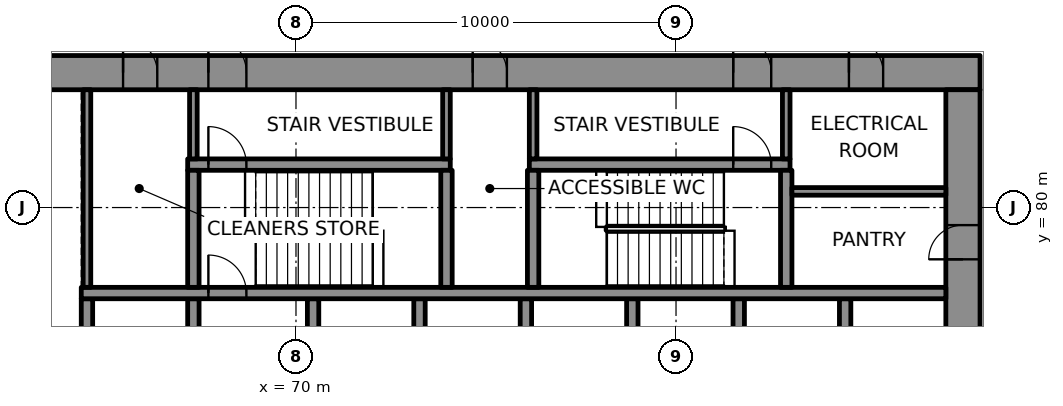
"""IFC4 building model, lengths in metres.
Left out: names, types, materials, properties, quantities, classifications, styles, units other than length and angle.
Written with IfcOpenShell. Run it as: python <this file> out.ifc"""

import sys

from ifc_helpers import new_model, si_unit, direction, frame, frame_2d, origin, place, context, subcontext, project, spatial, rectangle, extrude, element, fill, save


model = new_model("IFC4")
c1 = context("Model", 3, precision=1e-05, world=origin(), true_north=direction((0.0, 1.0)))
c2 = subcontext(c1, "Body", "Model", "MODEL_VIEW")
j1 = project(units=[si_unit("LENGTHUNIT", "METRE"), si_unit("PLANEANGLEUNIT", "RADIAN")], contexts=[c1])
p1 = place(None, origin())
s1 = spatial("IfcSite", under=j1, at=p1, CompositionType="ELEMENT")
p2 = place(p1, origin())
s2 = spatial("IfcBuilding", under=s1, at=p2, CompositionType="ELEMENT")
p3 = place(p2, frame((0.0, 0.0, 128.2)))
s3 = spatial("IfcBuildingStorey", under=s2, at=p3, CompositionType="ELEMENT", Elevation=128.2)
p4 = place(p3, frame((62.0, 83.55, 0.0), z_axis=(0.0, 0.0, 1.0), x_axis=(1.0, 0.0, 0.0)))
e1 = element("IfcWall", 1, at=p4, inside=s3, PredefinedType="SHEAR", context=c2, shape_type="SweptSolid", body=[
    extrude(rectangle(XDim=26.0, YDim=0.9, at=frame_2d((13.0, 0.0))), origin(), (0.0, 0.0, 1.0), 4.0),
])
p5 = place(p4, frame((5.695, 0.0, 0.0)))
e2 = element("IfcOpeningElement", 2, at=p5, cuts=e1, PredefinedType="OPENING", context=c2, shape_type="SweptSolid", body=[
    extrude(rectangle(XDim=1.0, YDim=2.1, at=frame_2d((0.5, 1.05))), frame((0.0, 0.46, 0.0), z_axis=(0.0, -1.0, 0.0), x_axis=(1.0, 0.0, 0.0)), (0.0, 0.0, 1.0), 0.92),
])
p6 = place(p4, frame((19.505, 0.0, 0.0)))
e3 = element("IfcOpeningElement", 3, at=p6, cuts=e1, PredefinedType="OPENING", context=c2, shape_type="SweptSolid", body=[
    extrude(rectangle(XDim=1.0, YDim=2.1, at=frame_2d((0.5, 1.05))), frame((0.0, 0.46, 0.0), z_axis=(0.0, -1.0, 0.0), x_axis=(1.0, 0.0, 0.0)), (0.0, 0.0, 1.0), 0.92),
])
p7 = place(p4, frame((3.45, 0.0, 0.0)))
e4 = element("IfcOpeningElement", 4, at=p7, cuts=e1, PredefinedType="OPENING", context=c2, shape_type="SweptSolid", body=[
    extrude(rectangle(XDim=0.9, YDim=2.1, at=frame_2d((0.45, 1.05))), frame((0.0, 0.46, 0.0), z_axis=(0.0, -1.0, 0.0), x_axis=(1.0, 0.0, 0.0)), (0.0, 0.0, 1.0), 0.92),
])
p8 = place(p4, frame((12.65, 0.0, 0.0)))
e5 = element("IfcOpeningElement", 5, at=p8, cuts=e1, PredefinedType="OPENING", context=c2, shape_type="SweptSolid", body=[
    extrude(rectangle(XDim=0.9, YDim=2.1, at=frame_2d((0.45, 1.05))), frame((0.0, 0.46, 0.0), z_axis=(0.0, -1.0, 0.0), x_axis=(1.0, 0.0, 0.0)), (0.0, 0.0, 1.0), 0.92),
])
p9 = place(p4, frame((22.55, 0.0, 0.0)))
e6 = element("IfcOpeningElement", 6, at=p9, cuts=e1, PredefinedType="OPENING", context=c2, shape_type="SweptSolid", body=[
    extrude(rectangle(XDim=0.9, YDim=2.1, at=frame_2d((0.45, 1.05))), frame((0.0, 0.46, 0.0), z_axis=(0.0, -1.0, 0.0), x_axis=(1.0, 0.0, 0.0)), (0.0, 0.0, 1.0), 0.92),
])
p10 = place(p3, frame((87.55, 66.9, 0.0), z_axis=(0.0, 0.0, 1.0), x_axis=(0.0, 1.0, 0.0)))
e7 = element("IfcWall", 7, at=p10, inside=s3, PredefinedType="SHEAR", context=c2, shape_type="SweptSolid", body=[
    extrude(rectangle(XDim=16.2, YDim=0.9, at=frame_2d((8.1, 0.0))), origin(), (0.0, 0.0, 1.0), 4.0),
])
p11 = place(p10, frame((5.5, 0.0, 0.0)))
e8 = element("IfcOpeningElement", 8, at=p11, cuts=e7, PredefinedType="OPENING", context=c2, shape_type="SweptSolid", body=[
    extrude(rectangle(XDim=1.8, YDim=2.1, at=frame_2d((0.9, 1.05))), frame((0.0, 0.46, 0.0), z_axis=(0.0, -1.0, 0.0), x_axis=(1.0, 0.0, 0.0)), (0.0, 0.0, 1.0), 0.92),
])
p12 = place(p10, frame((11.738, 0.0, 0.0)))
e9 = element("IfcOpeningElement", 9, at=p12, cuts=e7, PredefinedType="OPENING", context=c2, shape_type="SweptSolid", body=[
    extrude(rectangle(XDim=0.9, YDim=2.1, at=frame_2d((0.45, 1.05))), frame((0.0, 0.46, 0.0), z_axis=(0.0, -1.0, 0.0), x_axis=(1.0, 0.0, 0.0)), (0.0, 0.0, 1.0), 0.92),
])
for number, where, z_axis, x_axis in (
    (10, (64.5, 75.0, 0.0), (0.0, 0.0, 1.0), (0.0, 1.0, 0.0)),
    (11, (67.3, 75.0, 0.0), (0.0, 0.0, 1.0), (0.0, 1.0, 0.0)),
):
    element("IfcWall", number, at=place(p3, frame(where, z_axis=z_axis, x_axis=x_axis)), inside=s3, PredefinedType="SHEAR", context=c2, shape_type="SweptSolid", body=[
        extrude(rectangle(XDim=2.6, YDim=0.3, at=frame_2d((1.3, 0.0))), origin(), (0.0, 0.0, 1.0), 4.0),
    ])
p13 = place(p3, frame((70.45, 75.0, 0.0), z_axis=(0.0, 0.0, 1.0), x_axis=(0.0, 1.0, 0.0)))
e12 = element("IfcWall", 12, at=p13, inside=s3, PredefinedType="SHEAR", context=c2, shape_type="SweptSolid", body=[
    extrude(rectangle(XDim=2.6, YDim=0.3, at=frame_2d((1.3, 0.0))), origin(), (0.0, 0.0, 1.0), 4.0),
])
p14 = place(p13, frame((0.15, 0.0, 0.0)))
e13 = element("IfcOpeningElement", 13, at=p14, cuts=e12, PredefinedType="OPENING", context=c2, shape_type="SweptSolid", body=[
    extrude(rectangle(XDim=1.1, YDim=2.1, at=frame_2d((0.55, 1.05))), frame((0.0, 0.16, 0.0), z_axis=(0.0, -1.0, 0.0), x_axis=(1.0, 0.0, 0.0)), (0.0, 0.0, 1.0), 0.32),
])
for number, where, z_axis, x_axis in (
    (14, (73.25, 75.0, 0.0), (0.0, 0.0, 1.0), (0.0, 1.0, 0.0)),
    (15, (76.05, 75.0, 0.0), (0.0, 0.0, 1.0), (0.0, 1.0, 0.0)),
    (16, (78.85, 75.0, 0.0), (0.0, 0.0, 1.0), (0.0, 1.0, 0.0)),
    (17, (81.65, 75.0, 0.0), (0.0, 0.0, 1.0), (0.0, 1.0, 0.0)),
    (18, (84.45, 75.0, 0.0), (0.0, 0.0, 1.0), (0.0, 1.0, 0.0)),
):
    element("IfcWall", number, at=place(p3, frame(where, z_axis=z_axis, x_axis=x_axis)), inside=s3, PredefinedType="SHEAR", context=c2, shape_type="SweptSolid", body=[
        extrude(rectangle(XDim=2.6, YDim=0.3, at=frame_2d((1.3, 0.0))), origin(), (0.0, 0.0, 1.0), 4.0),
    ])
p15 = place(p3, frame((64.35, 77.75, 0.0), z_axis=(0.0, 0.0, 1.0), x_axis=(1.0, 0.0, 0.0)))
e19 = element("IfcWall", 19, at=p15, inside=s3, PredefinedType="SHEAR", context=c2, shape_type="SweptSolid", body=[
    extrude(rectangle(XDim=22.75, YDim=0.3, at=frame_2d((11.375, 0.0))), origin(), (0.0, 0.0, 1.0), 4.0),
])
p16 = place(p15, frame((3.345, 0.0, 0.0)))
e20 = element("IfcOpeningElement", 20, at=p16, cuts=e19, PredefinedType="OPENING", context=c2, shape_type="SweptSolid", body=[
    extrude(rectangle(XDim=1.0, YDim=2.1, at=frame_2d((0.5, 1.05))), frame((0.0, 0.16, 0.0), z_axis=(0.0, -1.0, 0.0), x_axis=(1.0, 0.0, 0.0)), (0.0, 0.0, 1.0), 0.32),
])
p17 = place(p3, frame((67.15, 81.13, 0.0), z_axis=(0.0, 0.0, 1.0), x_axis=(1.0, 0.0, 0.0)))
e21 = element("IfcWall", 21, at=p17, inside=s3, PredefinedType="SHEAR", context=c2, shape_type="SweptSolid", body=[
    extrude(rectangle(XDim=6.91, YDim=0.3, at=frame_2d((3.455, 0.0))), origin(), (0.0, 0.0, 1.0), 4.0),
])
p18 = place(p17, frame((0.545, 0.0, 0.0)))
e22 = element("IfcOpeningElement", 22, at=p18, cuts=e21, PredefinedType="OPENING", context=c2, shape_type="SweptSolid", body=[
    extrude(rectangle(XDim=1.0, YDim=2.1, at=frame_2d((0.5, 1.05))), frame((0.0, 0.16, 0.0), z_axis=(0.0, -1.0, 0.0), x_axis=(1.0, 0.0, 0.0)), (0.0, 0.0, 1.0), 0.32),
])
p19 = place(p3, frame((76.14, 81.13, 0.0), z_axis=(0.0, 0.0, 1.0), x_axis=(1.0, 0.0, 0.0)))
e23 = element("IfcWall", 23, at=p19, inside=s3, PredefinedType="SHEAR", context=c2, shape_type="SweptSolid", body=[
    extrude(rectangle(XDim=6.86, YDim=0.3, at=frame_2d((3.43, 0.0))), origin(), (0.0, 0.0, 1.0), 4.0),
])
p20 = place(p19, frame((5.365, 0.0, 0.0)))
e24 = element("IfcOpeningElement", 24, at=p20, cuts=e23, PredefinedType="OPENING", context=c2, shape_type="SweptSolid", body=[
    extrude(rectangle(XDim=1.0, YDim=2.1, at=frame_2d((0.5, 1.05))), frame((0.0, 0.16, 0.0), z_axis=(0.0, -1.0, 0.0), x_axis=(1.0, 0.0, 0.0)), (0.0, 0.0, 1.0), 0.32),
])
for number, where, z_axis, x_axis in (
    (25, (67.3, 77.9, 0.0), (0.0, 0.0, 1.0), (0.0, 1.0, 0.0)),
    (26, (73.96, 77.9, 0.0), (0.0, 0.0, 1.0), (0.0, 1.0, 0.0)),
    (27, (76.24, 77.9, 0.0), (0.0, 0.0, 1.0), (0.0, 1.0, 0.0)),
    (28, (82.9, 77.9, 0.0), (0.0, 0.0, 1.0), (0.0, 1.0, 0.0)),
):
    element("IfcWall", number, at=place(p3, frame(where, z_axis=z_axis, x_axis=x_axis)), inside=s3, PredefinedType="SHEAR", context=c2, shape_type="SweptSolid", body=[
        extrude(rectangle(XDim=3.08, YDim=0.3, at=frame_2d((1.54, 0.0))), origin(), (0.0, 0.0, 1.0), 4.0),
    ])
p21 = place(p3, frame((83.05, 80.425, 0.0), z_axis=(0.0, 0.0, 1.0), x_axis=(1.0, 0.0, 0.0)))
e29 = element("IfcWall", 29, at=p21, inside=s3, PredefinedType="PARTITIONING", context=c2, shape_type="SweptSolid", body=[
    extrude(rectangle(XDim=4.05, YDim=0.2, at=frame_2d((2.025, 0.0))), origin(), (0.0, 0.0, 1.0), 4.0),
])
p22 = place(p3, frame((64.5, 77.9, 0.0), z_axis=(0.0, 0.0, 1.0), x_axis=(0.0, 1.0, 0.0)))
e30 = element("IfcWall", 30, at=p22, inside=s3, PredefinedType="PARTITIONING", context=c2, shape_type="SweptSolid", body=[
    extrude(rectangle(XDim=5.2, YDim=0.2, at=frame_2d((2.6, 0.0))), origin(), (0.0, 0.0, 1.0), 4.0),
])
for number, where, z_axis, x_axis in (
    (31, (67.3, 81.28, 0.0), (0.0, 0.0, 1.0), (0.0, 1.0, 0.0)),
    (32, (73.96, 81.28, 0.0), (0.0, 0.0, 1.0), (0.0, 1.0, 0.0)),
    (33, (76.24, 81.28, 0.0), (0.0, 0.0, 1.0), (0.0, 1.0, 0.0)),
    (34, (82.9, 81.28, 0.0), (0.0, 0.0, 1.0), (0.0, 1.0, 0.0)),
):
    element("IfcWall", number, at=place(p3, frame(where, z_axis=z_axis, x_axis=x_axis)), inside=s3, PredefinedType="PARTITIONING", context=c2, shape_type="SweptSolid", body=[
        extrude(rectangle(XDim=1.82, YDim=0.2, at=frame_2d((0.91, 0.0))), origin(), (0.0, 0.0, 1.0), 4.0),
    ])
p23 = place(p16, origin())
e35 = element("IfcDoor", 35, at=p23, inside=s3, OperationType="SINGLE_SWING_LEFT", PredefinedType="DOOR", context=c2, shape_type="SweptSolid", body=[
    extrude(rectangle(XDim=1.0, YDim=2.1, at=frame_2d((0.5, 1.05))), frame((0.0, 0.025, 0.0), z_axis=(0.0, -1.0, 0.0), x_axis=(1.0, 0.0, 0.0)), (0.0, 0.0, 1.0), 0.05),
])
fill(e20, e35)
p24 = place(p18, origin())
e36 = element("IfcDoor", 36, at=p24, inside=s3, OperationType="SINGLE_SWING_RIGHT", PredefinedType="DOOR", context=c2, shape_type="SweptSolid", body=[
    extrude(rectangle(XDim=1.0, YDim=2.1, at=frame_2d((0.5, 1.05))), frame((0.0, 0.025, 0.0), z_axis=(0.0, -1.0, 0.0), x_axis=(1.0, 0.0, 0.0)), (0.0, 0.0, 1.0), 0.05),
])
fill(e22, e36)
p25 = place(p5, origin())
e37 = element("IfcDoor", 37, at=p25, inside=s3, OperationType="SINGLE_SWING_LEFT", PredefinedType="DOOR", context=c2, shape_type="SweptSolid", body=[
    extrude(rectangle(XDim=1.0, YDim=2.1, at=frame_2d((0.5, 1.05))), frame((0.0, 0.17, 0.0), z_axis=(0.0, -1.0, 0.0), x_axis=(1.0, 0.0, 0.0)), (0.0, 0.0, 1.0), 0.34),
])
fill(e2, e37)
p26 = place(p20, origin())
e38 = element("IfcDoor", 38, at=p26, inside=s3, OperationType="SINGLE_SWING_RIGHT", PredefinedType="DOOR", context=c2, shape_type="SweptSolid", body=[
    extrude(rectangle(XDim=1.0, YDim=2.1, at=frame_2d((0.5, 1.05))), frame((0.0, 0.025, 0.0), z_axis=(0.0, -1.0, 0.0), x_axis=(1.0, 0.0, 0.0)), (0.0, 0.0, 1.0), 0.05),
])
fill(e24, e38)
p27 = place(p6, origin())
e39 = element("IfcDoor", 39, at=p27, inside=s3, OperationType="SINGLE_SWING_LEFT", PredefinedType="DOOR", context=c2, shape_type="SweptSolid", body=[
    extrude(rectangle(XDim=1.0, YDim=2.1, at=frame_2d((0.5, 1.05))), frame((0.0, 0.17, 0.0), z_axis=(0.0, -1.0, 0.0), x_axis=(1.0, 0.0, 0.0)), (0.0, 0.0, 1.0), 0.34),
])
fill(e3, e39)
p28 = place(p7, origin())
e40 = element("IfcDoor", 40, at=p28, inside=s3, OperationType="SINGLE_SWING_RIGHT", PredefinedType="DOOR", context=c2, shape_type="SweptSolid", body=[
    extrude(rectangle(XDim=0.9, YDim=2.1, at=frame_2d((0.45, 1.05))), frame((0.0, 0.17, 0.0), z_axis=(0.0, -1.0, 0.0), x_axis=(1.0, 0.0, 0.0)), (0.0, 0.0, 1.0), 0.34),
])
fill(e4, e40)
p29 = place(p8, origin())
e41 = element("IfcDoor", 41, at=p29, inside=s3, OperationType="SINGLE_SWING_LEFT", PredefinedType="DOOR", context=c2, shape_type="SweptSolid", body=[
    extrude(rectangle(XDim=0.9, YDim=2.1, at=frame_2d((0.45, 1.05))), frame((0.0, 0.17, 0.0), z_axis=(0.0, -1.0, 0.0), x_axis=(1.0, 0.0, 0.0)), (0.0, 0.0, 1.0), 0.34),
])
fill(e5, e41)
p30 = place(p12, origin())
e42 = element("IfcDoor", 42, at=p30, inside=s3, OperationType="SINGLE_SWING_RIGHT", PredefinedType="DOOR", context=c2, shape_type="SweptSolid", body=[
    extrude(rectangle(XDim=0.9, YDim=2.1, at=frame_2d((0.45, 1.05))), frame((0.0, 0.17, 0.0), z_axis=(0.0, -1.0, 0.0), x_axis=(1.0, 0.0, 0.0)), (0.0, 0.0, 1.0), 0.34),
])
fill(e9, e42)
p31 = place(p9, origin())
e43 = element("IfcDoor", 43, at=p31, inside=s3, OperationType="SINGLE_SWING_LEFT", PredefinedType="DOOR", context=c2, shape_type="SweptSolid", body=[
    extrude(rectangle(XDim=0.9, YDim=2.1, at=frame_2d((0.45, 1.05))), frame((0.0, 0.17, 0.0), z_axis=(0.0, -1.0, 0.0), x_axis=(1.0, 0.0, 0.0)), (0.0, 0.0, 1.0), 0.34),
])
fill(e6, e43)
save(model, sys.argv[1])
